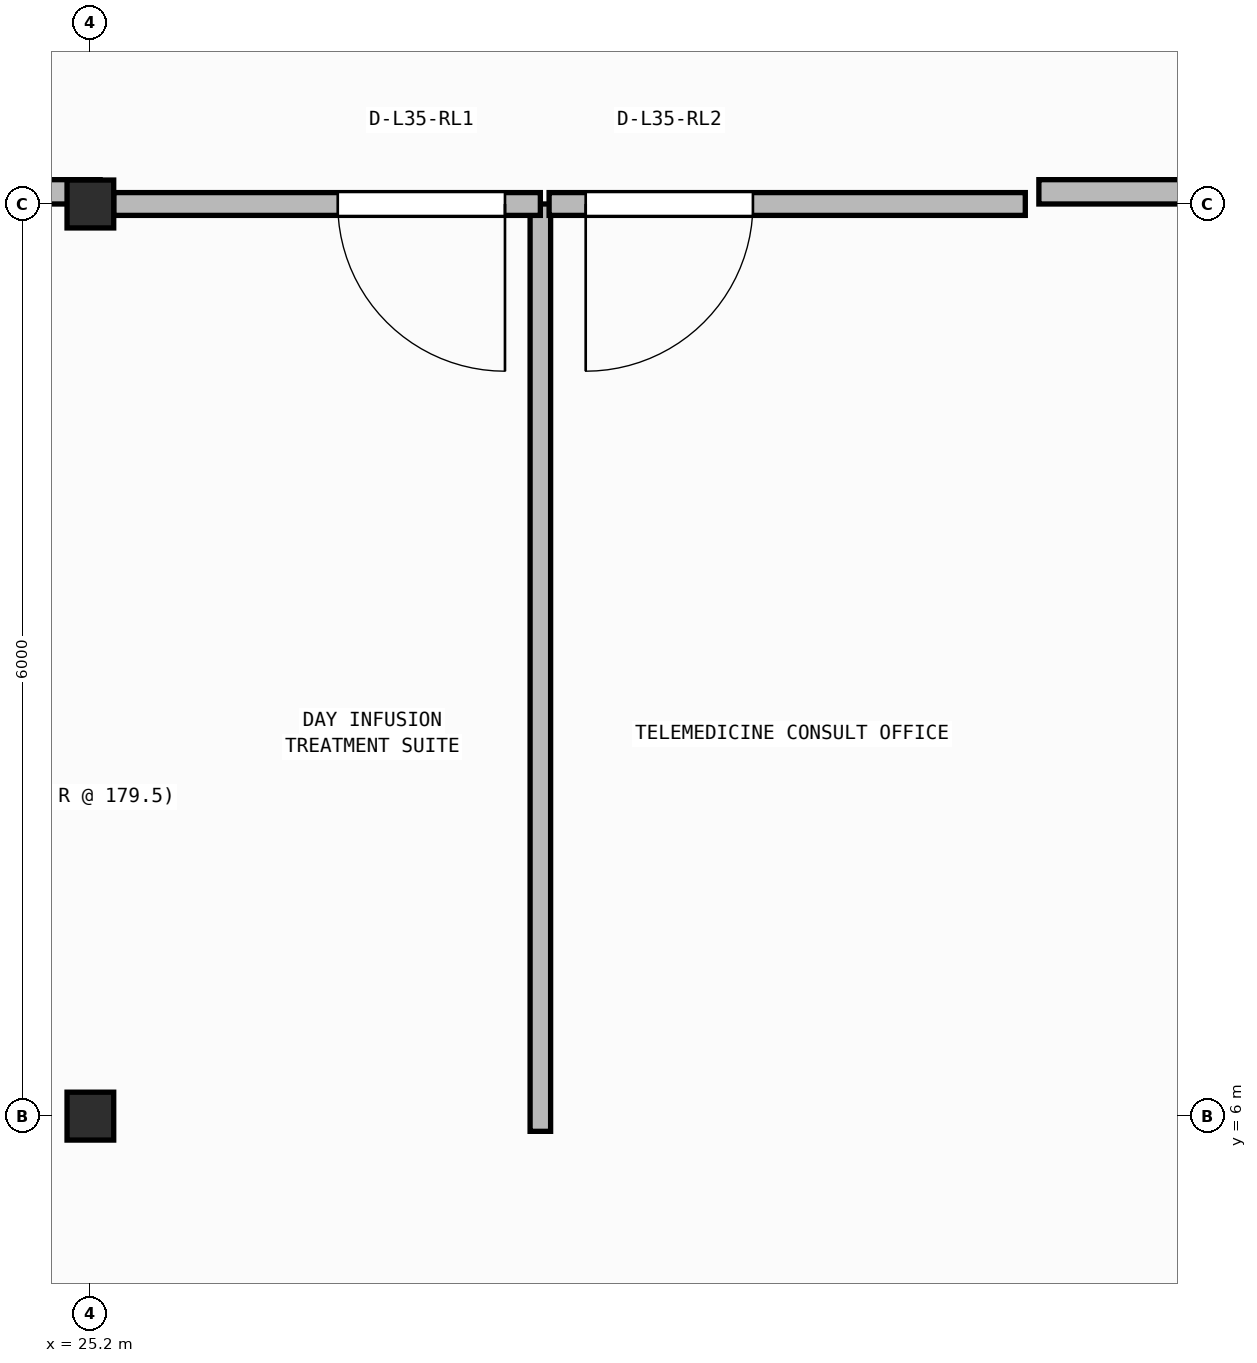
"""IFC4 building model, lengths in metres.
Left out: names, types, materials, properties, quantities, classifications, styles, units other than length and angle.
Written with IfcOpenShell. Run it as: python <this file> out.ifc"""

import sys

from ifc_helpers import new_model, si_unit, direction, frame, frame_2d, origin, origin_2d, place, context, subcontext, project, spatial, rectangle, i_section, extrude, element, fill, save


model = new_model("IFC4")
c1 = context("Model", 3, precision=1e-05, world=origin(), true_north=direction((0.0, 1.0)))
c2 = subcontext(c1, "Body", "Model", "MODEL_VIEW")
j1 = project(units=[si_unit("LENGTHUNIT", "METRE"), si_unit("PLANEANGLEUNIT", "RADIAN")], contexts=[c1])
p1 = place(None, origin())
s1 = spatial("IfcSite", under=j1, at=p1, CompositionType="ELEMENT")
p2 = place(p1, origin())
s2 = spatial("IfcBuilding", under=s1, at=p2, CompositionType="ELEMENT")
p3 = place(p2, frame((0.0, 0.0, 142.85)))
s3 = spatial("IfcBuildingStorey", under=s2, at=p3, CompositionType="ELEMENT", Elevation=142.85)
for number, where, z_axis, x_axis in (
    (1, (25.2, 6.0, 0.0), (0.0, 0.0, 1.0), (1.0, 0.0, 0.0)),
    (2, (25.2, 12.0, 0.0), (0.0, 0.0, 1.0), (1.0, 0.0, 0.0)),
):
    element("IfcColumn", number, at=place(p3, frame(where, z_axis=z_axis, x_axis=x_axis)), inside=s3, PredefinedType="COLUMN", context=c2, shape_type="SweptSolid", body=[
        extrude(i_section(OverallWidth=0.307, OverallDepth=0.315, WebThickness=0.012, FlangeThickness=0.019, FilletRadius=0.017, at=origin_2d()), origin(), (0.0, 0.0, 1.0), 3.95),
    ])
p4 = place(p3, frame((28.16, 5.9, 0.0), z_axis=(0.0, 0.0, 1.0), x_axis=(0.0, 1.0, 0.0)))
e3 = element("IfcWall", 3, at=p4, inside=s3, PredefinedType="PARTITIONING", context=c2, shape_type="SweptSolid", body=[
    extrude(rectangle(XDim=6.1, YDim=0.135, at=frame_2d((3.05, 0.0))), origin(), (0.0, 0.0, 1.0), 3.71),
])
p5 = place(p3, frame((28.16, 12.0, 0.0), z_axis=(0.0, 0.0, 1.0), x_axis=(-1.0, 0.0, 0.0)))
e4 = element("IfcWall", 4, at=p5, inside=s3, PredefinedType="PARTITIONING", context=c2, shape_type="SweptSolid", body=[
    extrude(rectangle(XDim=2.806, YDim=0.15, at=frame_2d((1.403, 0.0))), origin(), (0.0, 0.0, 1.0), 3.083),
])
p6 = place(p5, frame((0.233, 0.0, 0.0)))
e5 = element("IfcOpeningElement", 5, at=p6, cuts=e4, PredefinedType="OPENING", context=c2, shape_type="SweptSolid", body=[
    extrude(rectangle(XDim=1.1, YDim=2.1, at=frame_2d((0.55, 1.05))), frame((0.0, 0.085, 0.0), z_axis=(0.0, -1.0, 0.0), x_axis=(1.0, 0.0, 0.0)), (0.0, 0.0, 1.0), 0.17),
])
p7 = place(p3, frame((31.35, 12.0, 0.0), z_axis=(0.0, 0.0, 1.0), x_axis=(-1.0, 0.0, 0.0)))
e6 = element("IfcWall", 6, at=p7, inside=s3, PredefinedType="PARTITIONING", context=c2, shape_type="SweptSolid", body=[
    extrude(rectangle(XDim=3.133, YDim=0.15, at=frame_2d((1.566, 0.0))), origin(), (0.0, 0.0, 1.0), 3.083),
])
p8 = place(p7, frame((1.792, 0.0, 0.0)))
e7 = element("IfcOpeningElement", 7, at=p8, cuts=e6, PredefinedType="OPENING", context=c2, shape_type="SweptSolid", body=[
    extrude(rectangle(XDim=1.1, YDim=2.1, at=frame_2d((0.55, 1.05))), frame((0.0, 0.085, 0.0), z_axis=(0.0, -1.0, 0.0), x_axis=(1.0, 0.0, 0.0)), (0.0, 0.0, 1.0), 0.17),
])
p9 = place(p3, frame((24.02, 12.08, 0.0), z_axis=(0.0, 0.0, 1.0), x_axis=(1.0, 0.0, 0.0)))
e8 = element("IfcWall", 8, at=p9, inside=s3, PredefinedType="PARTITIONING", context=c2, shape_type="SweptSolid", body=[
    extrude(rectangle(XDim=1.244, YDim=0.16, at=frame_2d((0.622, 0.0))), origin(), (0.0, 0.0, 1.0), 3.083),
])
p10 = place(p3, frame((31.439, 12.08, 0.0), z_axis=(0.0, 0.0, 1.0), x_axis=(1.0, 0.0, 0.0)))
e9 = element("IfcWall", 9, at=p10, inside=s3, PredefinedType="PARTITIONING", context=c2, shape_type="SweptSolid", body=[
    extrude(rectangle(XDim=2.631, YDim=0.16, at=frame_2d((1.315, 0.0))), origin(), (0.0, 0.0, 1.0), 3.083),
])
p11 = place(p6, origin())
e10 = element("IfcDoor", 10, at=p11, inside=s3, OperationType="SINGLE_SWING_LEFT", PredefinedType="DOOR", context=c2, shape_type="SweptSolid", body=[
    extrude(rectangle(XDim=1.1, YDim=2.1, at=frame_2d((0.55, 1.05))), frame((0.0, 0.025, 0.0), z_axis=(0.0, -1.0, 0.0), x_axis=(1.0, 0.0, 0.0)), (0.0, 0.0, 1.0), 0.05),
])
fill(e5, e10)
p12 = place(p8, origin())
e11 = element("IfcDoor", 11, at=p12, inside=s3, OperationType="SINGLE_SWING_RIGHT", PredefinedType="DOOR", context=c2, shape_type="SweptSolid", body=[
    extrude(rectangle(XDim=1.1, YDim=2.1, at=frame_2d((0.55, 1.05))), frame((0.0, 0.025, 0.0), z_axis=(0.0, -1.0, 0.0), x_axis=(1.0, 0.0, 0.0)), (0.0, 0.0, 1.0), 0.05),
])
fill(e7, e11)
save(model, sys.argv[1])
